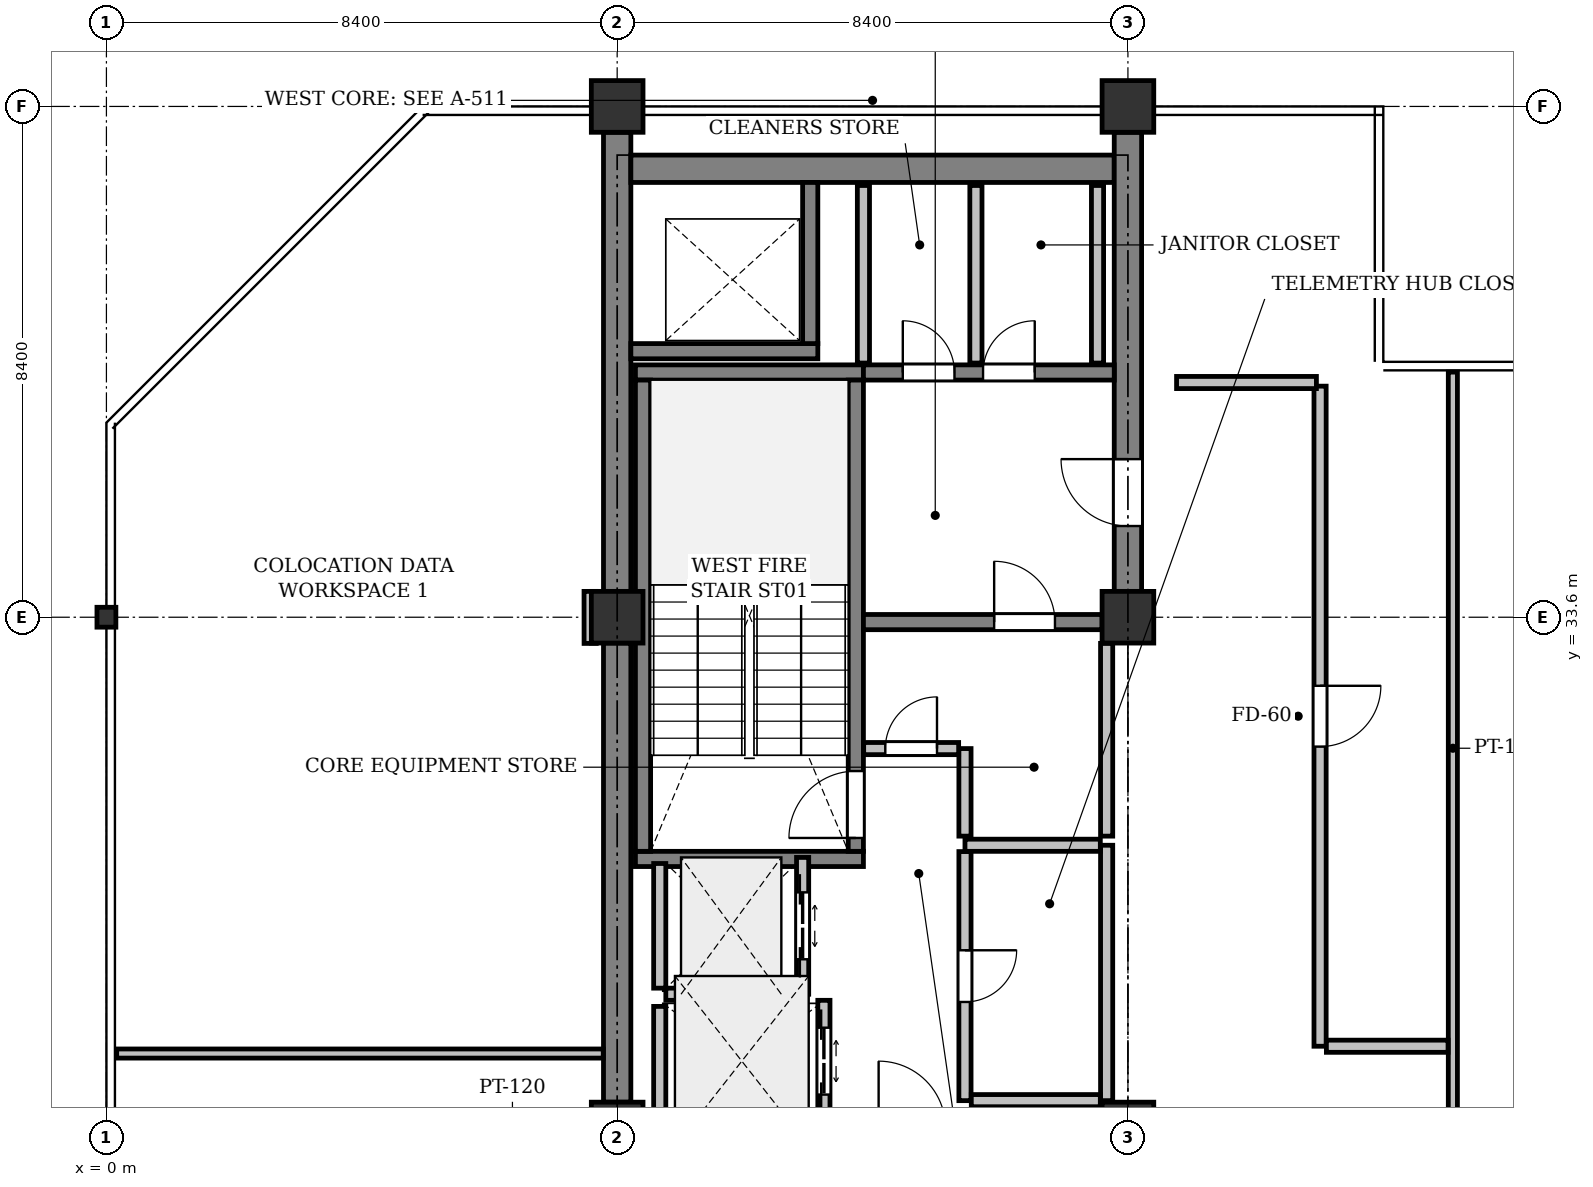
"""IFC4 building model, lengths in metres.
Left out: names, types, materials, properties, quantities, classifications, styles, units other than length and angle.
Written with IfcOpenShell. Run it as: python <this file> out.ifc"""

import sys

from ifc_helpers import new_model, si_unit, direction, frame, frame_2d, origin, origin_2d, place, context, subcontext, project, spatial, rectangle, i_section, extrude, element, fill, save


model = new_model("IFC4")
c1 = context("Model", 3, precision=1e-05, world=origin(), true_north=direction((0.0, 1.0)))
c2 = subcontext(c1, "Body", "Model", "MODEL_VIEW")
j1 = project(units=[si_unit("LENGTHUNIT", "METRE"), si_unit("PLANEANGLEUNIT", "RADIAN")], contexts=[c1])
p1 = place(None, origin())
s1 = spatial("IfcSite", under=j1, at=p1, CompositionType="ELEMENT")
p2 = place(p1, origin())
s2 = spatial("IfcBuilding", under=s1, at=p2, CompositionType="ELEMENT")
p3 = place(p2, frame((0.0, 0.0, 290.2)))
s3 = spatial("IfcBuildingStorey", under=s2, at=p3, CompositionType="ELEMENT", Elevation=290.2)
p4 = place(p3, frame((0.0, 33.6, 0.0), z_axis=(0.0, 0.0, 1.0), x_axis=(1.0, 0.0, 0.0)))
e1 = element("IfcColumn", 1, at=p4, inside=s3, PredefinedType="COLUMN", context=c2, shape_type="SweptSolid", body=[
    extrude(i_section(OverallWidth=0.311, OverallDepth=0.327, WebThickness=0.016, FlangeThickness=0.025, FilletRadius=0.017, at=origin_2d()), origin(), (0.0, 0.0, 1.0), 4.0),
])
for number, where, z_axis, x_axis in (
    (2, (8.4, 25.2, 0.0), (0.0, 0.0, 1.0), (1.0, 0.0, 0.0)),
    (3, (8.4, 33.6, 0.0), (0.0, 0.0, 1.0), (1.0, 0.0, 0.0)),
    (4, (8.4, 42.0, 0.0), (0.0, 0.0, 1.0), (1.0, 0.0, 0.0)),
    (5, (16.8, 25.2, 0.0), (0.0, 0.0, 1.0), (1.0, 0.0, 0.0)),
    (6, (16.8, 33.6, 0.0), (0.0, 0.0, 1.0), (1.0, 0.0, 0.0)),
    (7, (16.8, 42.0, 0.0), (0.0, 0.0, 1.0), (1.0, 0.0, 0.0)),
):
    element("IfcColumn", number, at=place(p3, frame(where, z_axis=z_axis, x_axis=x_axis)), inside=s3, PredefinedType="COLUMN", context=c2, shape_type="SweptSolid", body=[
        extrude(rectangle(XDim=0.85, YDim=0.85, at=origin_2d()), origin(), (0.0, 0.0, 1.0), 4.0),
    ])
for number, where, z_axis, x_axis in (
    (8, (8.4, 25.625, 0.0), (0.0, 0.0, 1.0), (0.0, 1.0, 0.0)),
    (9, (8.4, 34.025, 0.0), (0.0, 0.0, 1.0), (0.0, 1.0, 0.0)),
):
    element("IfcWall", number, at=place(p3, frame(where, z_axis=z_axis, x_axis=x_axis)), inside=s3, PredefinedType="SHEAR", context=c2, shape_type="SweptSolid", body=[
        extrude(rectangle(XDim=7.55, YDim=0.45, at=frame_2d((3.775, 0.0))), origin(), (0.0, 0.0, 1.0), 3.725),
    ])
p5 = place(p3, frame((8.625, 40.975, 0.0), z_axis=(0.0, 0.0, 1.0), x_axis=(1.0, 0.0, 0.0)))
e10 = element("IfcWall", 10, at=p5, inside=s3, PredefinedType="SHEAR", context=c2, shape_type="SweptSolid", body=[
    extrude(rectangle(XDim=7.95, YDim=0.45, at=frame_2d((3.975, 0.0))), origin(), (0.0, 0.0, 1.0), 3.725),
])
p6 = place(p3, frame((16.8, 34.025, 0.0), z_axis=(0.0, 0.0, 1.0), x_axis=(0.0, 1.0, 0.0)))
e11 = element("IfcWall", 11, at=p6, inside=s3, PredefinedType="SHEAR", context=c2, shape_type="SweptSolid", body=[
    extrude(rectangle(XDim=7.55, YDim=0.45, at=frame_2d((3.775, 0.0))), origin(), (0.0, 0.0, 1.0), 3.725),
])
p7 = place(p6, frame((1.075, 0.0, 0.0)))
e12 = element("IfcOpeningElement", 12, at=p7, cuts=e11, PredefinedType="OPENING", context=c2, shape_type="SweptSolid", body=[
    extrude(rectangle(XDim=1.1, YDim=2.15, at=frame_2d((0.55, 1.075))), frame((0.0, 0.235, 0.0), z_axis=(0.0, -1.0, 0.0), x_axis=(1.0, 0.0, 0.0)), (0.0, 0.0, 1.0), 0.47),
])
for number, where, z_axis, x_axis in (
    (13, (12.45, 29.625, 0.0), (0.0, 0.0, 1.0), (-1.0, 0.0, 0.0)),
    (14, (12.45, 37.625, 0.0), (0.0, 0.0, 1.0), (-1.0, 0.0, 0.0)),
):
    element("IfcWall", number, at=place(p3, frame(where, z_axis=z_axis, x_axis=x_axis)), inside=s3, PredefinedType="SHEAR", context=c2, shape_type="SweptSolid", body=[
        extrude(rectangle(XDim=3.75, YDim=0.25, at=frame_2d((1.875, 0.0))), origin(), (0.0, 0.0, 1.0), 3.725),
    ])
p8 = place(p3, frame((12.325, 29.75, 0.0), z_axis=(0.0, 0.0, 1.0), x_axis=(0.0, 1.0, 0.0)))
e15 = element("IfcWall", 15, at=p8, inside=s3, PredefinedType="SHEAR", context=c2, shape_type="SweptSolid", body=[
    extrude(rectangle(XDim=7.75, YDim=0.25, at=frame_2d((3.875, 0.0))), origin(), (0.0, 0.0, 1.0), 3.725),
])
p9 = place(p8, frame((0.22, 0.0, 0.0)))
e16 = element("IfcOpeningElement", 16, at=p9, cuts=e15, PredefinedType="OPENING", context=c2, shape_type="SweptSolid", body=[
    extrude(rectangle(XDim=1.1, YDim=2.15, at=frame_2d((0.55, 1.075))), frame((0.0, 0.135, 0.0), z_axis=(0.0, -1.0, 0.0), x_axis=(1.0, 0.0, 0.0)), (0.0, 0.0, 1.0), 0.27),
])
p10 = place(p3, frame((8.825, 29.75, 0.0), z_axis=(0.0, 0.0, 1.0), x_axis=(0.0, 1.0, 0.0)))
e17 = element("IfcWall", 17, at=p10, inside=s3, PredefinedType="SHEAR", context=c2, shape_type="SweptSolid", body=[
    extrude(rectangle(XDim=7.75, YDim=0.25, at=frame_2d((3.875, 0.0))), origin(), (0.0, 0.0, 1.0), 3.725),
])
p11 = place(p3, frame((8.625, 37.975, 0.0), z_axis=(0.0, 0.0, 1.0), x_axis=(1.0, 0.0, 0.0)))
e18 = element("IfcWall", 18, at=p11, inside=s3, PredefinedType="SHEAR", context=c2, shape_type="SweptSolid", body=[
    extrude(rectangle(XDim=3.075, YDim=0.25, at=frame_2d((1.538, 0.0))), origin(), (0.0, 0.0, 1.0), 3.725),
])
p12 = place(p3, frame((11.575, 38.1, 0.0), z_axis=(0.0, 0.0, 1.0), x_axis=(0.0, 1.0, 0.0)))
e19 = element("IfcWall", 19, at=p12, inside=s3, PredefinedType="SHEAR", context=c2, shape_type="SweptSolid", body=[
    extrude(rectangle(XDim=2.65, YDim=0.25, at=frame_2d((1.325, 0.0))), origin(), (0.0, 0.0, 1.0), 3.725),
])
p13 = place(p3, frame((12.45, 33.52, 0.0), z_axis=(0.0, 0.0, 1.0), x_axis=(1.0, 0.0, 0.0)))
e20 = element("IfcWall", 20, at=p13, inside=s3, PredefinedType="SHEAR", context=c2, shape_type="SweptSolid", body=[
    extrude(rectangle(XDim=3.925, YDim=0.25, at=frame_2d((1.962, 0.0))), origin(), (0.0, 0.0, 1.0), 3.725),
])
p14 = place(p13, frame((2.15, 0.0, 0.0)))
e21 = element("IfcOpeningElement", 21, at=p14, cuts=e20, PredefinedType="OPENING", context=c2, shape_type="SweptSolid", body=[
    extrude(rectangle(XDim=1.0, YDim=2.15, at=frame_2d((0.5, 1.075))), frame((0.0, 0.135, 0.0), z_axis=(0.0, -1.0, 0.0), x_axis=(1.0, 0.0, 0.0)), (0.0, 0.0, 1.0), 0.27),
])
p15 = place(p3, frame((12.45, 37.625, 0.0), z_axis=(0.0, 0.0, 1.0), x_axis=(1.0, 0.0, 0.0)))
e22 = element("IfcWall", 22, at=p15, inside=s3, PredefinedType="SHEAR", context=c2, shape_type="SweptSolid", body=[
    extrude(rectangle(XDim=4.125, YDim=0.25, at=frame_2d((2.062, 0.0))), origin(), (0.0, 0.0, 1.0), 3.725),
])
p16 = place(p15, frame((0.647, 0.0, 0.0)))
e23 = element("IfcOpeningElement", 23, at=p16, cuts=e22, PredefinedType="OPENING", context=c2, shape_type="SweptSolid", body=[
    extrude(rectangle(XDim=0.85, YDim=2.15, at=frame_2d((0.425, 1.075))), frame((0.0, 0.135, 0.0), z_axis=(0.0, -1.0, 0.0), x_axis=(1.0, 0.0, 0.0)), (0.0, 0.0, 1.0), 0.27),
])
p17 = place(p15, frame((1.968, 0.0, 0.0)))
e24 = element("IfcOpeningElement", 24, at=p17, cuts=e22, PredefinedType="OPENING", context=c2, shape_type="SweptSolid", body=[
    extrude(rectangle(XDim=0.85, YDim=2.15, at=frame_2d((0.425, 1.075))), frame((0.0, 0.135, 0.0), z_axis=(0.0, -1.0, 0.0), x_axis=(1.0, 0.0, 0.0)), (0.0, 0.0, 1.0), 0.27),
])
p18 = place(p3, frame((11.45, 27.4, 0.0), z_axis=(0.0, 0.0, 1.0), x_axis=(0.0, 1.0, 0.0)))
e25 = element("IfcWall", 25, at=p18, inside=s3, PredefinedType="PARTITIONING", context=c2, shape_type="SweptSolid", body=[
    extrude(rectangle(XDim=2.25, YDim=0.2, at=frame_2d((1.125, 0.0))), origin(), (0.0, 0.0, 1.0), 3.725),
])
p19 = place(p18, frame((0.575, 0.0, 0.0)))
e26 = element("IfcOpeningElement", 26, at=p19, cuts=e25, PredefinedType="OPENING", context=c2, shape_type="SweptSolid", body=[
    extrude(rectangle(XDim=1.1, YDim=2.2, at=frame_2d((0.55, 1.1))), frame((0.0, 0.11, 0.0), z_axis=(0.0, -1.0, 0.0), x_axis=(1.0, 0.0, 0.0)), (0.0, 0.0, 1.0), 0.22),
])
p20 = place(p3, frame((9.1, 27.5, 0.0), z_axis=(0.0, 0.0, 1.0), x_axis=(0.0, 1.0, 0.0)))
e27 = element("IfcWall", 27, at=p20, inside=s3, PredefinedType="PARTITIONING", context=c2, shape_type="SweptSolid", body=[
    extrude(rectangle(XDim=2.05, YDim=0.2, at=frame_2d((1.025, 0.0))), origin(), (0.0, 0.0, 1.0), 3.725),
])
p21 = place(p3, frame((9.2, 27.4, 0.0), z_axis=(0.0, 0.0, 1.0), x_axis=(1.0, 0.0, 0.0)))
e28 = element("IfcWall", 28, at=p21, inside=s3, PredefinedType="PARTITIONING", context=c2, shape_type="SweptSolid", body=[
    extrude(rectangle(XDim=2.15, YDim=0.2, at=frame_2d((1.075, 0.0))), origin(), (0.0, 0.0, 1.0), 3.725),
])
p22 = place(p3, frame((11.8, 25.3, 0.0), z_axis=(0.0, 0.0, 1.0), x_axis=(0.0, 1.0, 0.0)))
e29 = element("IfcWall", 29, at=p22, inside=s3, PredefinedType="PARTITIONING", context=c2, shape_type="SweptSolid", body=[
    extrude(rectangle(XDim=2.0, YDim=0.2, at=frame_2d((1.0, 0.0))), origin(), (0.0, 0.0, 1.0), 3.725),
])
p23 = place(p22, frame((0.45, 0.0, 0.0)))
e30 = element("IfcOpeningElement", 30, at=p23, cuts=e29, PredefinedType="OPENING", context=c2, shape_type="SweptSolid", body=[
    extrude(rectangle(XDim=1.1, YDim=2.2, at=frame_2d((0.55, 1.1))), frame((0.0, 0.11, 0.0), z_axis=(0.0, -1.0, 0.0), x_axis=(1.0, 0.0, 0.0)), (0.0, 0.0, 1.0), 0.22),
])
p24 = place(p3, frame((9.1, 25.4, 0.0), z_axis=(0.0, 0.0, 1.0), x_axis=(0.0, 1.0, 0.0)))
e31 = element("IfcWall", 31, at=p24, inside=s3, PredefinedType="PARTITIONING", context=c2, shape_type="SweptSolid", body=[
    extrude(rectangle(XDim=1.8, YDim=0.2, at=frame_2d((0.9, 0.0))), origin(), (0.0, 0.0, 1.0), 3.725),
])
p25 = place(p3, frame((16.45, 25.65, 0.0), z_axis=(0.0, 0.0, 1.0), x_axis=(0.0, 1.0, 0.0)))
e32 = element("IfcWall", 32, at=p25, inside=s3, PredefinedType="PARTITIONING", context=c2, shape_type="SweptSolid", body=[
    extrude(rectangle(XDim=4.2, YDim=0.2, at=frame_2d((2.1, 0.0))), origin(), (0.0, 0.0, 1.0), 3.725),
])
p26 = place(p3, frame((16.346, 29.85, 0.0), z_axis=(0.0, 0.0, 1.0), x_axis=(-1.0, 0.0, 0.0)))
e33 = element("IfcWall", 33, at=p26, inside=s3, PredefinedType="PARTITIONING", context=c2, shape_type="SweptSolid", body=[
    extrude(rectangle(XDim=2.226, YDim=0.2, at=frame_2d((1.113, 0.0))), origin(), (0.0, 0.0, 1.0), 3.725),
])
p27 = place(p3, frame((14.12, 29.746, 0.0), z_axis=(0.0, 0.0, 1.0), x_axis=(0.0, -1.0, 0.0)))
e34 = element("IfcWall", 34, at=p27, inside=s3, PredefinedType="PARTITIONING", context=c2, shape_type="SweptSolid", body=[
    extrude(rectangle(XDim=4.096, YDim=0.2, at=frame_2d((2.048, 0.0))), origin(), (0.0, 0.0, 1.0), 3.725),
])
p28 = place(p27, frame((1.623, 0.0, 0.0)))
e35 = element("IfcOpeningElement", 35, at=p28, cuts=e34, PredefinedType="OPENING", context=c2, shape_type="SweptSolid", body=[
    extrude(rectangle(XDim=0.85, YDim=2.15, at=frame_2d((0.425, 1.075))), frame((0.0, 0.11, 0.0), z_axis=(0.0, -1.0, 0.0), x_axis=(1.0, 0.0, 0.0)), (0.0, 0.0, 1.0), 0.22),
])
p29 = place(p3, frame((14.224, 25.65, 0.0), z_axis=(0.0, 0.0, 1.0), x_axis=(1.0, 0.0, 0.0)))
e36 = element("IfcWall", 36, at=p29, inside=s3, PredefinedType="PARTITIONING", context=c2, shape_type="SweptSolid", body=[
    extrude(rectangle(XDim=2.122, YDim=0.2, at=frame_2d((1.061, 0.0))), origin(), (0.0, 0.0, 1.0), 3.725),
])
p30 = place(p3, frame((14.12, 31.44, 0.0), z_axis=(0.0, 0.0, 1.0), x_axis=(0.0, -1.0, 0.0)))
e37 = element("IfcWall", 37, at=p30, inside=s3, PredefinedType="PARTITIONING", context=c2, shape_type="SweptSolid", body=[
    extrude(rectangle(XDim=1.44, YDim=0.2, at=frame_2d((0.72, 0.0))), origin(), (0.0, 0.0, 1.0), 3.725),
])
p31 = place(p3, frame((16.45, 30.0, 0.0), z_axis=(0.0, 0.0, 1.0), x_axis=(0.0, 1.0, 0.0)))
e38 = element("IfcWall", 38, at=p31, inside=s3, PredefinedType="PARTITIONING", context=c2, shape_type="SweptSolid", body=[
    extrude(rectangle(XDim=3.17, YDim=0.2, at=frame_2d((1.585, 0.0))), origin(), (0.0, 0.0, 1.0), 3.725),
])
p32 = place(p3, frame((12.454, 31.44, 0.0), z_axis=(0.0, 0.0, 1.0), x_axis=(1.0, 0.0, 0.0)))
e39 = element("IfcWall", 39, at=p32, inside=s3, PredefinedType="PARTITIONING", context=c2, shape_type="SweptSolid", body=[
    extrude(rectangle(XDim=1.562, YDim=0.2, at=frame_2d((0.781, 0.0))), origin(), (0.0, 0.0, 1.0), 3.725),
])
p33 = place(p32, frame((0.356, 0.0, 0.0)))
e40 = element("IfcOpeningElement", 40, at=p33, cuts=e39, PredefinedType="OPENING", context=c2, shape_type="SweptSolid", body=[
    extrude(rectangle(XDim=0.85, YDim=2.15, at=frame_2d((0.425, 1.075))), frame((0.0, 0.11, 0.0), z_axis=(0.0, -1.0, 0.0), x_axis=(1.0, 0.0, 0.0)), (0.0, 0.0, 1.0), 0.22),
])
for number, where, z_axis, x_axis in (
    (41, (14.3, 37.78, 0.0), (0.0, 0.0, 1.0), (0.0, 1.0, 0.0)),
    (42, (12.45, 40.7, 0.0), (0.0, 0.0, 1.0), (0.0, -1.0, 0.0)),
    (43, (16.3, 37.78, 0.0), (0.0, 0.0, 1.0), (0.0, 1.0, 0.0)),
):
    element("IfcWall", number, at=place(p3, frame(where, z_axis=z_axis, x_axis=x_axis)), inside=s3, PredefinedType="PARTITIONING", context=c2, shape_type="SweptSolid", body=[
        extrude(rectangle(XDim=2.92, YDim=0.2, at=frame_2d((1.46, 0.0))), origin(), (0.0, 0.0, 1.0), 2.775),
    ])
p34 = place(p3, frame((22.144, 37.631, 0.0), z_axis=(0.0, 0.0, 1.0), x_axis=(0.0, -1.0, 0.0)))
e44 = element("IfcWall", 44, at=p34, inside=s3, PredefinedType="PARTITIONING", context=c2, shape_type="SweptSolid", body=[
    extrude(rectangle(XDim=12.371, YDim=0.15, at=frame_2d((6.186, 0.0))), origin(), (0.0, 0.0, 1.0), 3.271),
])
p35 = place(p3, frame((8.171, 26.425, 0.0), z_axis=(0.0, 0.0, 1.0), x_axis=(-1.0, 0.0, 0.0)))
e45 = element("IfcWall", 45, at=p35, inside=s3, PredefinedType="PARTITIONING", context=c2, shape_type="SweptSolid", body=[
    extrude(rectangle(XDim=8.002, YDim=0.15, at=frame_2d((4.001, 0.0))), origin(), (0.0, 0.0, 1.0), 3.421),
])
p36 = place(p3, frame((19.96, 37.4, 0.0), z_axis=(0.0, 0.0, 1.0), x_axis=(0.0, -1.0, 0.0)))
e46 = element("IfcWall", 46, at=p36, inside=s3, PredefinedType="PARTITIONING", context=c2, shape_type="SweptSolid", body=[
    extrude(rectangle(XDim=10.855, YDim=0.2, at=frame_2d((5.427, 0.0))), origin(), (0.0, 0.0, 1.0), 3.271),
])
p37 = place(p36, frame((4.927, 0.0, 0.0)))
e47 = element("IfcOpeningElement", 47, at=p37, cuts=e46, PredefinedType="OPENING", context=c2, shape_type="SweptSolid", body=[
    extrude(rectangle(XDim=1.0, YDim=2.15, at=frame_2d((0.5, 1.075))), frame((0.0, 0.11, 0.0), z_axis=(0.0, -1.0, 0.0), x_axis=(1.0, 0.0, 0.0)), (0.0, 0.0, 1.0), 0.22),
])
p38 = place(p3, frame((20.064, 26.545, 0.0), z_axis=(0.0, 0.0, 1.0), x_axis=(1.0, 0.0, 0.0)))
e48 = element("IfcWall", 48, at=p38, inside=s3, PredefinedType="PARTITIONING", context=c2, shape_type="SweptSolid", body=[
    extrude(rectangle(XDim=2.001, YDim=0.2, at=frame_2d((1.0, 0.0))), origin(), (0.0, 0.0, 1.0), 3.421),
])
p39 = place(p3, frame((7.956, 33.169, 0.0), z_axis=(0.0, 0.0, 1.0), x_axis=(-0.000855919801, 0.999999633701, 0.0)))
e49 = element("IfcWall", 49, at=p39, inside=s3, PredefinedType="PARTITIONING", context=c2, shape_type="SweptSolid", body=[
    extrude(rectangle(XDim=0.856, YDim=0.2, at=frame_2d((0.428, 0.0))), origin(), (0.0, 0.0, 1.0), 3.271),
])
p40 = place(p3, frame((17.6, 37.46, 0.0), z_axis=(0.0, 0.0, 1.0), x_axis=(1.0, 0.0, 0.0)))
e50 = element("IfcWall", 50, at=p40, inside=s3, PredefinedType="PARTITIONING", context=c2, shape_type="SweptSolid", body=[
    extrude(rectangle(XDim=2.3, YDim=0.2, at=frame_2d((1.15, 0.0))), origin(), (0.0, 0.0, 1.0), 3.725),
])
p41 = place(p7, origin())
e51 = element("IfcDoor", 51, at=p41, inside=s3, OperationType="SINGLE_SWING_RIGHT", PredefinedType="DOOR", context=c2, shape_type="SweptSolid", body=[
    extrude(rectangle(XDim=1.1, YDim=2.15, at=frame_2d((0.55, 1.075))), frame((0.0, 0.025, 0.0), z_axis=(0.0, -1.0, 0.0), x_axis=(1.0, 0.0, 0.0)), (0.0, 0.0, 1.0), 0.05),
])
fill(e12, e51)
p42 = place(p9, origin())
e52 = element("IfcDoor", 52, at=p42, inside=s3, OperationType="SINGLE_SWING_LEFT", PredefinedType="DOOR", context=c2, shape_type="SweptSolid", body=[
    extrude(rectangle(XDim=1.1, YDim=2.15, at=frame_2d((0.55, 1.075))), frame((0.0, 0.025, 0.0), z_axis=(0.0, -1.0, 0.0), x_axis=(1.0, 0.0, 0.0)), (0.0, 0.0, 1.0), 0.05),
])
fill(e16, e52)
p43 = place(p14, origin())
e53 = element("IfcDoor", 53, at=p43, inside=s3, OperationType="SINGLE_SWING_LEFT", PredefinedType="DOOR", context=c2, shape_type="SweptSolid", body=[
    extrude(rectangle(XDim=1.0, YDim=2.15, at=frame_2d((0.5, 1.075))), frame((0.0, 0.025, 0.0), z_axis=(0.0, -1.0, 0.0), x_axis=(1.0, 0.0, 0.0)), (0.0, 0.0, 1.0), 0.05),
])
fill(e21, e53)
p44 = place(p19, origin())
e54 = element("IfcDoor", 54, at=p44, inside=s3, OperationType="DOUBLE_DOOR_SLIDING", PredefinedType="DOOR", context=c2, shape_type="SweptSolid", body=[
    extrude(rectangle(XDim=1.1, YDim=2.2, at=frame_2d((0.55, 1.1))), frame((0.0, 0.025, 0.0), z_axis=(0.0, -1.0, 0.0), x_axis=(1.0, 0.0, 0.0)), (0.0, 0.0, 1.0), 0.05),
])
fill(e26, e54)
p45 = place(p23, origin())
e55 = element("IfcDoor", 55, at=p45, inside=s3, OperationType="DOUBLE_DOOR_SLIDING", PredefinedType="DOOR", context=c2, shape_type="SweptSolid", body=[
    extrude(rectangle(XDim=1.1, YDim=2.2, at=frame_2d((0.55, 1.1))), frame((0.0, 0.025, 0.0), z_axis=(0.0, -1.0, 0.0), x_axis=(1.0, 0.0, 0.0)), (0.0, 0.0, 1.0), 0.05),
])
fill(e30, e55)
p46 = place(p28, origin())
e56 = element("IfcDoor", 56, at=p46, inside=s3, OperationType="SINGLE_SWING_LEFT", PredefinedType="DOOR", context=c2, shape_type="SweptSolid", body=[
    extrude(rectangle(XDim=0.85, YDim=2.15, at=frame_2d((0.425, 1.075))), frame((0.0, 0.025, 0.0), z_axis=(0.0, -1.0, 0.0), x_axis=(1.0, 0.0, 0.0)), (0.0, 0.0, 1.0), 0.05),
])
fill(e35, e56)
p47 = place(p33, origin())
e57 = element("IfcDoor", 57, at=p47, inside=s3, OperationType="SINGLE_SWING_RIGHT", PredefinedType="DOOR", context=c2, shape_type="SweptSolid", body=[
    extrude(rectangle(XDim=0.85, YDim=2.15, at=frame_2d((0.425, 1.075))), frame((0.0, 0.025, 0.0), z_axis=(0.0, -1.0, 0.0), x_axis=(1.0, 0.0, 0.0)), (0.0, 0.0, 1.0), 0.05),
])
fill(e40, e57)
p48 = place(p16, origin())
e58 = element("IfcDoor", 58, at=p48, inside=s3, OperationType="SINGLE_SWING_LEFT", PredefinedType="DOOR", context=c2, shape_type="SweptSolid", body=[
    extrude(rectangle(XDim=0.85, YDim=2.15, at=frame_2d((0.425, 1.075))), frame((0.0, 0.025, 0.0), z_axis=(0.0, -1.0, 0.0), x_axis=(1.0, 0.0, 0.0)), (0.0, 0.0, 1.0), 0.05),
])
fill(e23, e58)
p49 = place(p17, origin())
e59 = element("IfcDoor", 59, at=p49, inside=s3, OperationType="SINGLE_SWING_RIGHT", PredefinedType="DOOR", context=c2, shape_type="SweptSolid", body=[
    extrude(rectangle(XDim=0.85, YDim=2.15, at=frame_2d((0.425, 1.075))), frame((0.0, 0.025, 0.0), z_axis=(0.0, -1.0, 0.0), x_axis=(1.0, 0.0, 0.0)), (0.0, 0.0, 1.0), 0.05),
])
fill(e24, e59)
p50 = place(p37, origin())
e60 = element("IfcDoor", 60, at=p50, inside=s3, OperationType="SINGLE_SWING_LEFT", PredefinedType="DOOR", context=c2, shape_type="SweptSolid", body=[
    extrude(rectangle(XDim=1.0, YDim=2.15, at=frame_2d((0.5, 1.075))), frame((0.0, 0.025, 0.0), z_axis=(0.0, -1.0, 0.0), x_axis=(1.0, 0.0, 0.0)), (0.0, 0.0, 1.0), 0.05),
])
fill(e47, e60)
save(model, sys.argv[1])
